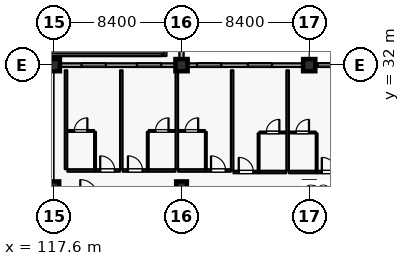
"""IFC4 building model, lengths in metres.
Left out: names, types, materials, properties, quantities, classifications, styles, units other than length and angle.
Written with IfcOpenShell. Run it as: python <this file> out.ifc"""

import sys

from ifc_helpers import new_model, si_unit, direction, frame, frame_2d, origin, origin_2d, place, context, subcontext, project, spatial, rectangle, extrude, element, fill, save


model = new_model("IFC4")
c1 = context("Model", 3, precision=1e-05, world=origin(), true_north=direction((0.0, 1.0)))
c2 = subcontext(c1, "Body", "Model", "MODEL_VIEW")
j1 = project(units=[si_unit("LENGTHUNIT", "METRE"), si_unit("PLANEANGLEUNIT", "RADIAN")], contexts=[c1])
p1 = place(None, origin())
s1 = spatial("IfcSite", under=j1, at=p1, CompositionType="ELEMENT")
p2 = place(p1, origin())
s2 = spatial("IfcBuilding", under=s1, at=p2, CompositionType="ELEMENT")
p3 = place(p2, frame((0.0, 0.0, 11.4)))
s3 = spatial("IfcBuildingStorey", under=s2, at=p3, CompositionType="ELEMENT", Elevation=11.4)
for number, where, z_axis, x_axis in (
    (1, (117.6, 32.0, 0.0), (0.0, 0.0, 1.0), (1.0, 0.0, 0.0)),
    (2, (126.0, 32.0, 0.0), (0.0, 0.0, 1.0), (1.0, 0.0, 0.0)),
    (3, (134.4, 32.0, 0.0), (0.0, 0.0, 1.0), (1.0, 0.0, 0.0)),
):
    element("IfcColumn", number, at=place(p3, frame(where, z_axis=z_axis, x_axis=x_axis)), inside=s3, PredefinedType="COLUMN", context=c2, shape_type="SweptSolid", body=[
        extrude(rectangle(XDim=0.8, YDim=0.8, at=origin_2d()), origin(), (0.0, 0.0, 1.0), 4.8),
    ])
for number, where, z_axis, x_axis in (
    (4, (117.6, 24.0, 0.0), (0.0, 0.0, 1.0), (1.0, 0.0, 0.0)),
    (5, (126.0, 24.0, 0.0), (0.0, 0.0, 1.0), (1.0, 0.0, 0.0)),
    (6, (134.4, 24.0, 0.0), (0.0, 0.0, 1.0), (1.0, 0.0, 0.0)),
):
    element("IfcColumn", number, at=place(p3, frame(where, z_axis=z_axis, x_axis=x_axis)), inside=s3, PredefinedType="COLUMN", context=c2, shape_type="SweptSolid", body=[
        extrude(rectangle(XDim=0.7, YDim=0.7, at=origin_2d()), origin(), (0.0, 0.0, 1.0), 4.8),
    ])
p4 = place(p3, frame((126.0, 39.65, 0.0), z_axis=(0.0, 0.0, 1.0), x_axis=(0.0, -1.0, 0.0)))
e7 = element("IfcWall", 7, at=p4, inside=s3, PredefinedType="SOLIDWALL", context=c2, shape_type="SweptSolid", body=[
    extrude(rectangle(XDim=7.25, YDim=0.28, at=frame_2d((3.625, 0.0))), origin(), (0.0, 0.0, 1.0), 4.5),
])
p5 = place(p4, frame((2.625, 0.0, 1.0)))
e8 = element("IfcOpeningElement", 8, at=p5, cuts=e7, PredefinedType="OPENING", context=c2, shape_type="SweptSolid", body=[
    extrude(rectangle(XDim=2.0, YDim=1.75, at=frame_2d((1.0, 0.875))), frame((0.0, 0.15, 0.0), z_axis=(0.0, -1.0, 0.0), x_axis=(1.0, 0.0, 0.0)), (0.0, 0.0, 1.0), 0.3),
])
p6 = place(p3, frame((118.0, 32.0, 0.0), z_axis=(0.0, 0.0, 1.0), x_axis=(1.0, 0.0, 0.0)))
e9 = element("IfcWall", 9, at=p6, inside=s3, PredefinedType="SOLIDWALL", context=c2, shape_type="SweptSolid", body=[
    extrude(rectangle(XDim=7.6, YDim=0.24, at=frame_2d((3.8, 0.0))), origin(), (0.0, 0.0, 1.0), 4.1),
])
p7 = place(p6, frame((1.42, 0.0, 0.8)))
e10 = element("IfcOpeningElement", 10, at=p7, cuts=e9, PredefinedType="OPENING", context=c2, shape_type="SweptSolid", body=[
    extrude(rectangle(XDim=1.6, YDim=1.6, at=frame_2d((0.8, 0.8))), frame((0.0, 0.13, 0.0), z_axis=(0.0, -1.0, 0.0), x_axis=(1.0, 0.0, 0.0)), (0.0, 0.0, 1.0), 0.26),
])
p8 = place(p6, frame((5.065, 0.0, 0.8)))
e11 = element("IfcOpeningElement", 11, at=p8, cuts=e9, PredefinedType="OPENING", context=c2, shape_type="SweptSolid", body=[
    extrude(rectangle(XDim=1.6, YDim=1.6, at=frame_2d((0.8, 0.8))), frame((0.0, 0.13, 0.0), z_axis=(0.0, -1.0, 0.0), x_axis=(1.0, 0.0, 0.0)), (0.0, 0.0, 1.0), 0.26),
])
p9 = place(p3, frame((126.4, 32.0, 0.0), z_axis=(0.0, 0.0, 1.0), x_axis=(1.0, 0.0, 0.0)))
e12 = element("IfcWall", 12, at=p9, inside=s3, PredefinedType="SOLIDWALL", context=c2, shape_type="SweptSolid", body=[
    extrude(rectangle(XDim=7.6, YDim=0.24, at=frame_2d((3.8, 0.0))), origin(), (0.0, 0.0, 1.0), 4.1),
])
p10 = place(p9, frame((0.615, 0.0, 0.8)))
e13 = element("IfcOpeningElement", 13, at=p10, cuts=e12, PredefinedType="OPENING", context=c2, shape_type="SweptSolid", body=[
    extrude(rectangle(XDim=1.6, YDim=1.6, at=frame_2d((0.8, 0.8))), frame((0.0, 0.13, 0.0), z_axis=(0.0, -1.0, 0.0), x_axis=(1.0, 0.0, 0.0)), (0.0, 0.0, 1.0), 0.26),
])
p11 = place(p9, frame((3.955, 0.0, 0.8)))
e14 = element("IfcOpeningElement", 14, at=p11, cuts=e12, PredefinedType="OPENING", context=c2, shape_type="SweptSolid", body=[
    extrude(rectangle(XDim=1.6, YDim=1.6, at=frame_2d((0.8, 0.8))), frame((0.0, 0.13, 0.0), z_axis=(0.0, -1.0, 0.0), x_axis=(1.0, 0.0, 0.0)), (0.0, 0.0, 1.0), 0.26),
])
p12 = place(p3, frame((134.8, 32.0, 0.0), z_axis=(0.0, 0.0, 1.0), x_axis=(1.0, 0.0, 0.0)))
e15 = element("IfcWall", 15, at=p12, inside=s3, PredefinedType="SOLIDWALL", context=c2, shape_type="SweptSolid", body=[
    extrude(rectangle(XDim=7.6, YDim=0.24, at=frame_2d((3.8, 0.0))), origin(), (0.0, 0.0, 1.0), 4.13),
])
p13 = place(p12, frame((0.16, 0.0, 0.8)))
e16 = element("IfcOpeningElement", 16, at=p13, cuts=e15, PredefinedType="OPENING", context=c2, shape_type="SweptSolid", body=[
    extrude(rectangle(XDim=1.4, YDim=1.6, at=frame_2d((0.7, 0.8))), frame((0.0, 0.13, 0.0), z_axis=(0.0, -1.0, 0.0), x_axis=(1.0, 0.0, 0.0)), (0.0, 0.0, 1.0), 0.26),
])
p14 = place(p12, frame((2.845, 0.0, 0.8)))
e17 = element("IfcOpeningElement", 17, at=p14, cuts=e15, PredefinedType="OPENING", context=c2, shape_type="SweptSolid", body=[
    extrude(rectangle(XDim=1.6, YDim=1.6, at=frame_2d((0.8, 0.8))), frame((0.0, 0.13, 0.0), z_axis=(0.0, -1.0, 0.0), x_axis=(1.0, 0.0, 0.0)), (0.0, 0.0, 1.0), 0.26),
])
p15 = place(p12, frame((5.785, 0.0, 0.8)))
e18 = element("IfcOpeningElement", 18, at=p15, cuts=e15, PredefinedType="OPENING", context=c2, shape_type="SweptSolid", body=[
    extrude(rectangle(XDim=1.6, YDim=1.6, at=frame_2d((0.8, 0.8))), frame((0.0, 0.13, 0.0), z_axis=(0.0, -1.0, 0.0), x_axis=(1.0, 0.0, 0.0)), (0.0, 0.0, 1.0), 0.26),
])
p16 = place(p3, frame((118.49, 25.07, 0.0), z_axis=(0.0, 0.0, 1.0), x_axis=(1.0, 0.0, 0.0)))
e19 = element("IfcWall", 19, at=p16, inside=s3, PredefinedType="PARTITIONING", context=c2, shape_type="SweptSolid", body=[
    extrude(rectangle(XDim=1.81, YDim=0.16, at=frame_2d((0.905, 0.0))), origin(), (0.0, 0.0, 1.0), 4.535),
])
p17 = place(p3, frame((120.31, 25.07, 0.0), z_axis=(0.0, 0.0, 1.0), x_axis=(1.0, 0.0, 0.0)))
e20 = element("IfcWall", 20, at=p17, inside=s3, PredefinedType="PARTITIONING", context=c2, shape_type="SweptSolid", body=[
    extrude(rectangle(XDim=1.64, YDim=0.16, at=frame_2d((0.82, 0.0))), origin(), (0.0, 0.0, 1.0), 4.535),
])
p18 = place(p17, frame((0.34, 0.0, 0.0)))
e21 = element("IfcOpeningElement", 21, at=p18, cuts=e20, PredefinedType="OPENING", context=c2, shape_type="SweptSolid", body=[
    extrude(rectangle(XDim=0.96, YDim=2.2, at=frame_2d((0.48, 1.1))), frame((0.0, 0.09, 0.0), z_axis=(0.0, -1.0, 0.0), x_axis=(1.0, 0.0, 0.0)), (0.0, 0.0, 1.0), 0.18),
])
p19 = place(p3, frame((120.31, 25.16, 0.0), z_axis=(0.0, 0.0, 1.0), x_axis=(0.0, 1.0, 0.0)))
e22 = element("IfcWall", 22, at=p19, inside=s3, PredefinedType="PARTITIONING", context=c2, shape_type="SweptSolid", body=[
    extrude(rectangle(XDim=2.45, YDim=0.115, at=frame_2d((1.225, 0.0))), origin(), (0.0, 0.0, 1.0), 4.535),
])
p20 = place(p3, frame((118.5, 27.67, 0.0), z_axis=(0.0, 0.0, 1.0), x_axis=(1.0, 0.0, 0.0)))
e23 = element("IfcWall", 23, at=p20, inside=s3, PredefinedType="PARTITIONING", context=c2, shape_type="SweptSolid", body=[
    extrude(rectangle(XDim=1.75, YDim=0.115, at=frame_2d((0.875, 0.0))), origin(), (0.0, 0.0, 1.0), 4.535),
])
p21 = place(p20, frame((0.445, 0.0, 0.0)))
e24 = element("IfcOpeningElement", 24, at=p21, cuts=e23, PredefinedType="OPENING", context=c2, shape_type="SweptSolid", body=[
    extrude(rectangle(XDim=0.86, YDim=2.12, at=frame_2d((0.43, 1.06))), frame((0.0, 0.067, 0.0), z_axis=(0.0, -1.0, 0.0), x_axis=(1.0, 0.0, 0.0)), (0.0, 0.0, 1.0), 0.135),
])
p22 = place(p3, frame((118.4, 25.16, 0.0), z_axis=(0.0, 0.0, 1.0), x_axis=(0.0, 1.0, 0.0)))
e25 = element("IfcWall", 25, at=p22, inside=s3, PredefinedType="PARTITIONING", context=c2, shape_type="SweptSolid", body=[
    extrude(rectangle(XDim=6.5, YDim=0.16, at=frame_2d((3.25, 0.0))), origin(), (0.0, 0.0, 1.0), 4.535),
])
p23 = place(p3, frame((122.13, 25.07, 0.0), z_axis=(0.0, 0.0, 1.0), x_axis=(1.0, 0.0, 0.0)))
e26 = element("IfcWall", 26, at=p23, inside=s3, PredefinedType="PARTITIONING", context=c2, shape_type="SweptSolid", body=[
    extrude(rectangle(XDim=1.65, YDim=0.16, at=frame_2d((0.825, 0.0))), origin(), (0.0, 0.0, 1.0), 4.535),
])
p24 = place(p23, frame((0.345, 0.0, 0.0)))
e27 = element("IfcOpeningElement", 27, at=p24, cuts=e26, PredefinedType="OPENING", context=c2, shape_type="SweptSolid", body=[
    extrude(rectangle(XDim=0.96, YDim=2.2, at=frame_2d((0.48, 1.1))), frame((0.0, 0.09, 0.0), z_axis=(0.0, -1.0, 0.0), x_axis=(1.0, 0.0, 0.0)), (0.0, 0.0, 1.0), 0.18),
])
p25 = place(p3, frame((123.79, 25.07, 0.0), z_axis=(0.0, 0.0, 1.0), x_axis=(1.0, 0.0, 0.0)))
e28 = element("IfcWall", 28, at=p25, inside=s3, PredefinedType="PARTITIONING", context=c2, shape_type="SweptSolid", body=[
    extrude(rectangle(XDim=1.81, YDim=0.16, at=frame_2d((0.905, 0.0))), origin(), (0.0, 0.0, 1.0), 4.535),
])
p26 = place(p3, frame((123.78, 25.16, 0.0), z_axis=(0.0, 0.0, 1.0), x_axis=(0.0, 1.0, 0.0)))
e29 = element("IfcWall", 29, at=p26, inside=s3, PredefinedType="PARTITIONING", context=c2, shape_type="SweptSolid", body=[
    extrude(rectangle(XDim=2.45, YDim=0.115, at=frame_2d((1.225, 0.0))), origin(), (0.0, 0.0, 1.0), 4.535),
])
p27 = place(p3, frame((123.84, 27.67, 0.0), z_axis=(0.0, 0.0, 1.0), x_axis=(1.0, 0.0, 0.0)))
e30 = element("IfcWall", 30, at=p27, inside=s3, PredefinedType="PARTITIONING", context=c2, shape_type="SweptSolid", body=[
    extrude(rectangle(XDim=1.75, YDim=0.115, at=frame_2d((0.875, 0.0))), origin(), (0.0, 0.0, 1.0), 4.535),
])
p28 = place(p27, frame((0.445, 0.0, 0.0)))
e31 = element("IfcOpeningElement", 31, at=p28, cuts=e30, PredefinedType="OPENING", context=c2, shape_type="SweptSolid", body=[
    extrude(rectangle(XDim=0.86, YDim=2.12, at=frame_2d((0.43, 1.06))), frame((0.0, 0.067, 0.0), z_axis=(0.0, -1.0, 0.0), x_axis=(1.0, 0.0, 0.0)), (0.0, 0.0, 1.0), 0.135),
])
p29 = place(p3, frame((122.04, 25.16, 0.0), z_axis=(0.0, 0.0, 1.0), x_axis=(0.0, 1.0, 0.0)))
e32 = element("IfcWall", 32, at=p29, inside=s3, PredefinedType="PARTITIONING", context=c2, shape_type="SweptSolid", body=[
    extrude(rectangle(XDim=6.5, YDim=0.16, at=frame_2d((3.25, 0.0))), origin(), (0.0, 0.0, 1.0), 4.535),
])
p30 = place(p3, frame((125.78, 25.07, 0.0), z_axis=(0.0, 0.0, 1.0), x_axis=(1.0, 0.0, 0.0)))
e33 = element("IfcWall", 33, at=p30, inside=s3, PredefinedType="PARTITIONING", context=c2, shape_type="SweptSolid", body=[
    extrude(rectangle(XDim=1.81, YDim=0.16, at=frame_2d((0.905, 0.0))), origin(), (0.0, 0.0, 1.0), 4.535),
])
p31 = place(p3, frame((127.6, 25.07, 0.0), z_axis=(0.0, 0.0, 1.0), x_axis=(1.0, 0.0, 0.0)))
e34 = element("IfcWall", 34, at=p31, inside=s3, PredefinedType="PARTITIONING", context=c2, shape_type="SweptSolid", body=[
    extrude(rectangle(XDim=1.64, YDim=0.16, at=frame_2d((0.82, 0.0))), origin(), (0.0, 0.0, 1.0), 4.535),
])
p32 = place(p31, frame((0.34, 0.0, 0.0)))
e35 = element("IfcOpeningElement", 35, at=p32, cuts=e34, PredefinedType="OPENING", context=c2, shape_type="SweptSolid", body=[
    extrude(rectangle(XDim=0.96, YDim=2.2, at=frame_2d((0.48, 1.1))), frame((0.0, 0.09, 0.0), z_axis=(0.0, -1.0, 0.0), x_axis=(1.0, 0.0, 0.0)), (0.0, 0.0, 1.0), 0.18),
])
p33 = place(p3, frame((127.6, 25.16, 0.0), z_axis=(0.0, 0.0, 1.0), x_axis=(0.0, 1.0, 0.0)))
e36 = element("IfcWall", 36, at=p33, inside=s3, PredefinedType="PARTITIONING", context=c2, shape_type="SweptSolid", body=[
    extrude(rectangle(XDim=2.45, YDim=0.115, at=frame_2d((1.225, 0.0))), origin(), (0.0, 0.0, 1.0), 4.535),
])
p34 = place(p3, frame((125.79, 27.67, 0.0), z_axis=(0.0, 0.0, 1.0), x_axis=(1.0, 0.0, 0.0)))
e37 = element("IfcWall", 37, at=p34, inside=s3, PredefinedType="PARTITIONING", context=c2, shape_type="SweptSolid", body=[
    extrude(rectangle(XDim=1.75, YDim=0.115, at=frame_2d((0.875, 0.0))), origin(), (0.0, 0.0, 1.0), 4.535),
])
p35 = place(p34, frame((0.445, 0.0, 0.0)))
e38 = element("IfcOpeningElement", 38, at=p35, cuts=e37, PredefinedType="OPENING", context=c2, shape_type="SweptSolid", body=[
    extrude(rectangle(XDim=0.86, YDim=2.12, at=frame_2d((0.43, 1.06))), frame((0.0, 0.067, 0.0), z_axis=(0.0, -1.0, 0.0), x_axis=(1.0, 0.0, 0.0)), (0.0, 0.0, 1.0), 0.135),
])
p36 = place(p3, frame((125.69, 25.16, 0.0), z_axis=(0.0, 0.0, 1.0), x_axis=(0.0, 1.0, 0.0)))
e39 = element("IfcWall", 39, at=p36, inside=s3, PredefinedType="PARTITIONING", context=c2, shape_type="SweptSolid", body=[
    extrude(rectangle(XDim=6.5, YDim=0.16, at=frame_2d((3.25, 0.0))), origin(), (0.0, 0.0, 1.0), 4.535),
])
p37 = place(p3, frame((129.42, 24.97, 0.0), z_axis=(0.0, 0.0, 1.0), x_axis=(1.0, 0.0, 0.0)))
e40 = element("IfcWall", 40, at=p37, inside=s3, PredefinedType="PARTITIONING", context=c2, shape_type="SweptSolid", body=[
    extrude(rectangle(XDim=1.65, YDim=0.16, at=frame_2d((0.825, 0.0))), origin(), (0.0, 0.0, 1.0), 4.535),
])
p38 = place(p37, frame((0.345, 0.0, 0.0)))
e41 = element("IfcOpeningElement", 41, at=p38, cuts=e40, PredefinedType="OPENING", context=c2, shape_type="SweptSolid", body=[
    extrude(rectangle(XDim=0.96, YDim=2.2, at=frame_2d((0.48, 1.1))), frame((0.0, 0.09, 0.0), z_axis=(0.0, -1.0, 0.0), x_axis=(1.0, 0.0, 0.0)), (0.0, 0.0, 1.0), 0.18),
])
p39 = place(p3, frame((131.08, 24.97, 0.0), z_axis=(0.0, 0.0, 1.0), x_axis=(1.0, 0.0, 0.0)))
e42 = element("IfcWall", 42, at=p39, inside=s3, PredefinedType="PARTITIONING", context=c2, shape_type="SweptSolid", body=[
    extrude(rectangle(XDim=1.81, YDim=0.16, at=frame_2d((0.905, 0.0))), origin(), (0.0, 0.0, 1.0), 4.535),
])
p40 = place(p3, frame((131.07, 25.06, 0.0), z_axis=(0.0, 0.0, 1.0), x_axis=(0.0, 1.0, 0.0)))
e43 = element("IfcWall", 43, at=p40, inside=s3, PredefinedType="PARTITIONING", context=c2, shape_type="SweptSolid", body=[
    extrude(rectangle(XDim=2.45, YDim=0.115, at=frame_2d((1.225, 0.0))), origin(), (0.0, 0.0, 1.0), 4.535),
])
p41 = place(p3, frame((131.13, 27.57, 0.0), z_axis=(0.0, 0.0, 1.0), x_axis=(1.0, 0.0, 0.0)))
e44 = element("IfcWall", 44, at=p41, inside=s3, PredefinedType="PARTITIONING", context=c2, shape_type="SweptSolid", body=[
    extrude(rectangle(XDim=1.75, YDim=0.115, at=frame_2d((0.875, 0.0))), origin(), (0.0, 0.0, 1.0), 4.535),
])
p42 = place(p41, frame((0.445, 0.0, 0.0)))
e45 = element("IfcOpeningElement", 45, at=p42, cuts=e44, PredefinedType="OPENING", context=c2, shape_type="SweptSolid", body=[
    extrude(rectangle(XDim=0.86, YDim=2.12, at=frame_2d((0.43, 1.06))), frame((0.0, 0.067, 0.0), z_axis=(0.0, -1.0, 0.0), x_axis=(1.0, 0.0, 0.0)), (0.0, 0.0, 1.0), 0.135),
])
p43 = place(p3, frame((129.33, 25.06, 0.0), z_axis=(0.0, 0.0, 1.0), x_axis=(0.0, 1.0, 0.0)))
e46 = element("IfcWall", 46, at=p43, inside=s3, PredefinedType="PARTITIONING", context=c2, shape_type="SweptSolid", body=[
    extrude(rectangle(XDim=6.6, YDim=0.16, at=frame_2d((3.3, 0.0))), origin(), (0.0, 0.0, 1.0), 4.535),
])
p44 = place(p3, frame((133.07, 24.97, 0.0), z_axis=(0.0, 0.0, 1.0), x_axis=(1.0, 0.0, 0.0)))
e47 = element("IfcWall", 47, at=p44, inside=s3, PredefinedType="PARTITIONING", context=c2, shape_type="SweptSolid", body=[
    extrude(rectangle(XDim=1.81, YDim=0.16, at=frame_2d((0.905, 0.0))), origin(), (0.0, 0.0, 1.0), 4.535),
])
p45 = place(p3, frame((134.89, 24.97, 0.0), z_axis=(0.0, 0.0, 1.0), x_axis=(1.0, 0.0, 0.0)))
e48 = element("IfcWall", 48, at=p45, inside=s3, PredefinedType="PARTITIONING", context=c2, shape_type="SweptSolid", body=[
    extrude(rectangle(XDim=1.64, YDim=0.16, at=frame_2d((0.82, 0.0))), origin(), (0.0, 0.0, 1.0), 4.535),
])
p46 = place(p45, frame((0.34, 0.0, 0.0)))
e49 = element("IfcOpeningElement", 49, at=p46, cuts=e48, PredefinedType="OPENING", context=c2, shape_type="SweptSolid", body=[
    extrude(rectangle(XDim=0.96, YDim=2.2, at=frame_2d((0.48, 1.1))), frame((0.0, 0.09, 0.0), z_axis=(0.0, -1.0, 0.0), x_axis=(1.0, 0.0, 0.0)), (0.0, 0.0, 1.0), 0.18),
])
p47 = place(p3, frame((134.89, 25.06, 0.0), z_axis=(0.0, 0.0, 1.0), x_axis=(0.0, 1.0, 0.0)))
e50 = element("IfcWall", 50, at=p47, inside=s3, PredefinedType="PARTITIONING", context=c2, shape_type="SweptSolid", body=[
    extrude(rectangle(XDim=2.45, YDim=0.115, at=frame_2d((1.225, 0.0))), origin(), (0.0, 0.0, 1.0), 4.535),
])
p48 = place(p3, frame((133.08, 27.57, 0.0), z_axis=(0.0, 0.0, 1.0), x_axis=(1.0, 0.0, 0.0)))
e51 = element("IfcWall", 51, at=p48, inside=s3, PredefinedType="PARTITIONING", context=c2, shape_type="SweptSolid", body=[
    extrude(rectangle(XDim=1.75, YDim=0.115, at=frame_2d((0.875, 0.0))), origin(), (0.0, 0.0, 1.0), 4.535),
])
p49 = place(p48, frame((0.445, 0.0, 0.0)))
e52 = element("IfcOpeningElement", 52, at=p49, cuts=e51, PredefinedType="OPENING", context=c2, shape_type="SweptSolid", body=[
    extrude(rectangle(XDim=0.86, YDim=2.12, at=frame_2d((0.43, 1.06))), frame((0.0, 0.067, 0.0), z_axis=(0.0, -1.0, 0.0), x_axis=(1.0, 0.0, 0.0)), (0.0, 0.0, 1.0), 0.135),
])
p50 = place(p3, frame((132.98, 25.06, 0.0), z_axis=(0.0, 0.0, 1.0), x_axis=(0.0, 1.0, 0.0)))
e53 = element("IfcWall", 53, at=p50, inside=s3, PredefinedType="PARTITIONING", context=c2, shape_type="SweptSolid", body=[
    extrude(rectangle(XDim=6.6, YDim=0.16, at=frame_2d((3.3, 0.0))), origin(), (0.0, 0.0, 1.0), 4.535),
])
p51 = place(p3, frame((112.34, 32.68, 0.0), z_axis=(0.0, 0.0, 1.0), x_axis=(1.0, 0.0, 0.0)))
e54 = element("IfcWall", 54, at=p51, inside=s3, PredefinedType="PARTITIONING", context=c2, shape_type="SweptSolid", body=[
    extrude(rectangle(XDim=12.41, YDim=0.18, at=frame_2d((6.205, 0.0))), origin(), (0.0, 0.0, 1.0), 4.535),
])
p52 = place(p3, frame((124.92, 32.6, 0.0), z_axis=(0.0, 0.0, 1.0), x_axis=(0.0, 1.0, 0.0)))
e55 = element("IfcWall", 55, at=p52, inside=s3, PredefinedType="PARTITIONING", context=c2, shape_type="SweptSolid", body=[
    extrude(rectangle(XDim=11.6, YDim=0.18, at=frame_2d((5.8, 0.0))), origin(), (0.0, 0.0, 1.0), 4.535),
])
p53 = place(p7, origin())
e56 = element("IfcWindow", 56, at=p53, inside=s3, PartitioningType="SINGLE_PANEL", PredefinedType="WINDOW", context=c2, shape_type="SweptSolid", body=[
    extrude(rectangle(XDim=1.6, YDim=1.6, at=frame_2d((0.8, 0.8))), frame((0.0, 0.03, 0.0), z_axis=(0.0, -1.0, 0.0), x_axis=(1.0, 0.0, 0.0)), (0.0, 0.0, 1.0), 0.06),
])
fill(e10, e56)
p54 = place(p8, origin())
e57 = element("IfcWindow", 57, at=p54, inside=s3, PartitioningType="SINGLE_PANEL", PredefinedType="WINDOW", context=c2, shape_type="SweptSolid", body=[
    extrude(rectangle(XDim=1.6, YDim=1.6, at=frame_2d((0.8, 0.8))), frame((0.0, 0.03, 0.0), z_axis=(0.0, -1.0, 0.0), x_axis=(1.0, 0.0, 0.0)), (0.0, 0.0, 1.0), 0.06),
])
fill(e11, e57)
p55 = place(p10, origin())
e58 = element("IfcWindow", 58, at=p55, inside=s3, PartitioningType="SINGLE_PANEL", PredefinedType="WINDOW", context=c2, shape_type="SweptSolid", body=[
    extrude(rectangle(XDim=1.6, YDim=1.6, at=frame_2d((0.8, 0.8))), frame((0.0, 0.03, 0.0), z_axis=(0.0, -1.0, 0.0), x_axis=(1.0, 0.0, 0.0)), (0.0, 0.0, 1.0), 0.06),
])
fill(e13, e58)
p56 = place(p11, origin())
e59 = element("IfcWindow", 59, at=p56, inside=s3, PartitioningType="SINGLE_PANEL", PredefinedType="WINDOW", context=c2, shape_type="SweptSolid", body=[
    extrude(rectangle(XDim=1.6, YDim=1.6, at=frame_2d((0.8, 0.8))), frame((0.0, 0.03, 0.0), z_axis=(0.0, -1.0, 0.0), x_axis=(1.0, 0.0, 0.0)), (0.0, 0.0, 1.0), 0.06),
])
fill(e14, e59)
p57 = place(p13, origin())
e60 = element("IfcWindow", 60, at=p57, inside=s3, PartitioningType="SINGLE_PANEL", PredefinedType="WINDOW", context=c2, shape_type="SweptSolid", body=[
    extrude(rectangle(XDim=1.4, YDim=1.6, at=frame_2d((0.7, 0.8))), frame((0.0, 0.03, 0.0), z_axis=(0.0, -1.0, 0.0), x_axis=(1.0, 0.0, 0.0)), (0.0, 0.0, 1.0), 0.06),
])
fill(e16, e60)
p58 = place(p18, origin())
e61 = element("IfcDoor", 61, at=p58, inside=s3, OperationType="SINGLE_SWING_LEFT", PredefinedType="DOOR", context=c2, shape_type="SweptSolid", body=[
    extrude(rectangle(XDim=0.96, YDim=2.2, at=frame_2d((0.48, 1.1))), frame((0.0, 0.025, 0.0), z_axis=(0.0, -1.0, 0.0), x_axis=(1.0, 0.0, 0.0)), (0.0, 0.0, 1.0), 0.05),
])
fill(e21, e61)
p59 = place(p21, origin())
e62 = element("IfcDoor", 62, at=p59, inside=s3, OperationType="SINGLE_SWING_RIGHT", PredefinedType="DOOR", context=c2, shape_type="SweptSolid", body=[
    extrude(rectangle(XDim=0.86, YDim=2.12, at=frame_2d((0.43, 1.06))), frame((0.0, 0.025, 0.0), z_axis=(0.0, -1.0, 0.0), x_axis=(1.0, 0.0, 0.0)), (0.0, 0.0, 1.0), 0.05),
])
fill(e24, e62)
p60 = place(p24, origin())
e63 = element("IfcDoor", 63, at=p60, inside=s3, OperationType="SINGLE_SWING_LEFT", PredefinedType="DOOR", context=c2, shape_type="SweptSolid", body=[
    extrude(rectangle(XDim=0.96, YDim=2.2, at=frame_2d((0.48, 1.1))), frame((0.0, 0.025, 0.0), z_axis=(0.0, -1.0, 0.0), x_axis=(1.0, 0.0, 0.0)), (0.0, 0.0, 1.0), 0.05),
])
fill(e27, e63)
p61 = place(p28, origin())
e64 = element("IfcDoor", 64, at=p61, inside=s3, OperationType="SINGLE_SWING_RIGHT", PredefinedType="DOOR", context=c2, shape_type="SweptSolid", body=[
    extrude(rectangle(XDim=0.86, YDim=2.12, at=frame_2d((0.43, 1.06))), frame((0.0, 0.025, 0.0), z_axis=(0.0, -1.0, 0.0), x_axis=(1.0, 0.0, 0.0)), (0.0, 0.0, 1.0), 0.05),
])
fill(e31, e64)
p62 = place(p32, origin())
e65 = element("IfcDoor", 65, at=p62, inside=s3, OperationType="SINGLE_SWING_LEFT", PredefinedType="DOOR", context=c2, shape_type="SweptSolid", body=[
    extrude(rectangle(XDim=0.96, YDim=2.2, at=frame_2d((0.48, 1.1))), frame((0.0, 0.025, 0.0), z_axis=(0.0, -1.0, 0.0), x_axis=(1.0, 0.0, 0.0)), (0.0, 0.0, 1.0), 0.05),
])
fill(e35, e65)
p63 = place(p35, origin())
e66 = element("IfcDoor", 66, at=p63, inside=s3, OperationType="SINGLE_SWING_RIGHT", PredefinedType="DOOR", context=c2, shape_type="SweptSolid", body=[
    extrude(rectangle(XDim=0.86, YDim=2.12, at=frame_2d((0.43, 1.06))), frame((0.0, 0.025, 0.0), z_axis=(0.0, -1.0, 0.0), x_axis=(1.0, 0.0, 0.0)), (0.0, 0.0, 1.0), 0.05),
])
fill(e38, e66)
p64 = place(p38, origin())
e67 = element("IfcDoor", 67, at=p64, inside=s3, OperationType="SINGLE_SWING_LEFT", PredefinedType="DOOR", context=c2, shape_type="SweptSolid", body=[
    extrude(rectangle(XDim=0.96, YDim=2.2, at=frame_2d((0.48, 1.1))), frame((0.0, 0.025, 0.0), z_axis=(0.0, -1.0, 0.0), x_axis=(1.0, 0.0, 0.0)), (0.0, 0.0, 1.0), 0.05),
])
fill(e41, e67)
p65 = place(p42, origin())
e68 = element("IfcDoor", 68, at=p65, inside=s3, OperationType="SINGLE_SWING_RIGHT", PredefinedType="DOOR", context=c2, shape_type="SweptSolid", body=[
    extrude(rectangle(XDim=0.86, YDim=2.12, at=frame_2d((0.43, 1.06))), frame((0.0, 0.025, 0.0), z_axis=(0.0, -1.0, 0.0), x_axis=(1.0, 0.0, 0.0)), (0.0, 0.0, 1.0), 0.05),
])
fill(e45, e68)
p66 = place(p46, origin())
e69 = element("IfcDoor", 69, at=p66, inside=s3, OperationType="SINGLE_SWING_LEFT", PredefinedType="DOOR", context=c2, shape_type="SweptSolid", body=[
    extrude(rectangle(XDim=0.96, YDim=2.2, at=frame_2d((0.48, 1.1))), frame((0.0, 0.025, 0.0), z_axis=(0.0, -1.0, 0.0), x_axis=(1.0, 0.0, 0.0)), (0.0, 0.0, 1.0), 0.05),
])
fill(e49, e69)
p67 = place(p49, origin())
e70 = element("IfcDoor", 70, at=p67, inside=s3, OperationType="SINGLE_SWING_RIGHT", PredefinedType="DOOR", context=c2, shape_type="SweptSolid", body=[
    extrude(rectangle(XDim=0.86, YDim=2.12, at=frame_2d((0.43, 1.06))), frame((0.0, 0.025, 0.0), z_axis=(0.0, -1.0, 0.0), x_axis=(1.0, 0.0, 0.0)), (0.0, 0.0, 1.0), 0.05),
])
fill(e52, e70)
save(model, sys.argv[1])
